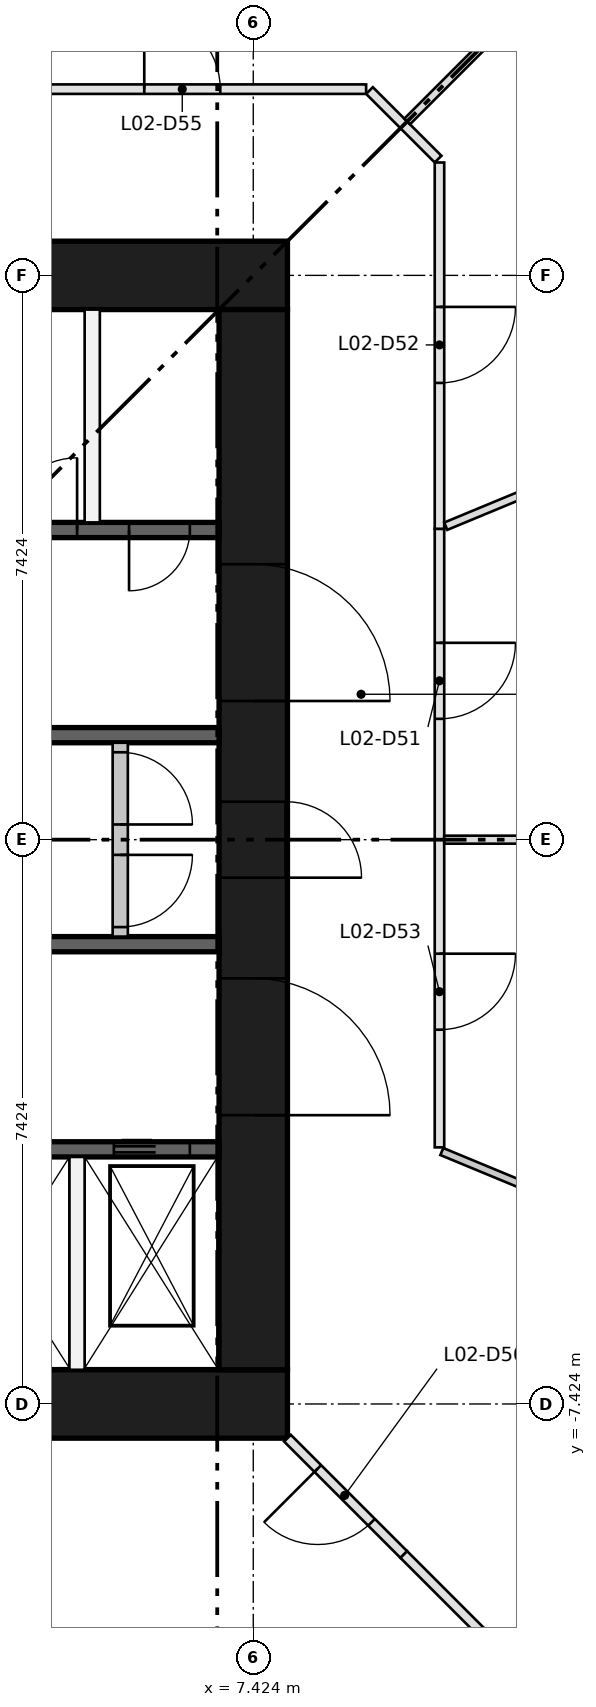
"""IFC4 building model, lengths in metres.
Left out: names, types, materials, properties, quantities, classifications, styles, units other than length and angle.
Written with IfcOpenShell. Run it as: python <this file> out.ifc"""

import sys

from ifc_helpers import new_model, si_unit, direction, frame, frame_2d, origin, place, context, subcontext, project, spatial, rectangle, extrude, element, fill, save


model = new_model("IFC4")
c1 = context("Model", 3, precision=1e-05, world=origin(), true_north=direction((0.0, 1.0)))
c2 = subcontext(c1, "Body", "Model", "MODEL_VIEW")
j1 = project(units=[si_unit("LENGTHUNIT", "METRE"), si_unit("PLANEANGLEUNIT", "RADIAN")], contexts=[c1])
p1 = place(None, origin())
s1 = spatial("IfcSite", under=j1, at=p1, CompositionType="ELEMENT")
p2 = place(p1, origin())
s2 = spatial("IfcBuilding", under=s1, at=p2, CompositionType="ELEMENT")
p3 = place(p2, frame((0.0, 0.0, 9.9)))
s3 = spatial("IfcBuildingStorey", under=s2, at=p3, CompositionType="ELEMENT", Elevation=9.9)
for number, where, z_axis, x_axis in (
    (1, (-7.874, -7.424, 0.0), (0.0, 0.0, 1.0), (1.0, 0.0, 0.0)),
    (2, (-7.874, 7.424, 0.0), (0.0, 0.0, 1.0), (1.0, 0.0, 0.0)),
):
    element("IfcWall", number, at=place(p3, frame(where, z_axis=z_axis, x_axis=x_axis)), inside=s3, PredefinedType="SHEAR", context=c2, shape_type="SweptSolid", body=[
        extrude(rectangle(XDim=15.748, YDim=0.9, at=frame_2d((7.874, 0.0))), origin(), (0.0, 0.0, 1.0), 4.5),
    ])
p4 = place(p3, frame((7.424, -6.974, 0.0), z_axis=(0.0, 0.0, 1.0), x_axis=(0.0, 1.0, 0.0)))
e3 = element("IfcWall", 3, at=p4, inside=s3, PredefinedType="SHEAR", context=c2, shape_type="SweptSolid", body=[
    extrude(rectangle(XDim=13.948, YDim=0.9, at=frame_2d((6.974, 0.0))), origin(), (0.0, 0.0, 1.0), 4.5),
])
p5 = place(p4, frame((6.474, 0.0, 0.0)))
e4 = element("IfcOpeningElement", 4, at=p5, cuts=e3, PredefinedType="OPENING", context=c2, shape_type="SweptSolid", body=[
    extrude(rectangle(XDim=1.0, YDim=2.1, at=frame_2d((0.5, 1.05))), frame((0.0, 0.46, 0.0), z_axis=(0.0, -1.0, 0.0), x_axis=(1.0, 0.0, 0.0)), (0.0, 0.0, 1.0), 0.92),
])
p6 = place(p4, frame((3.35, 0.0, 0.0)))
e5 = element("IfcOpeningElement", 5, at=p6, cuts=e3, PredefinedType="OPENING", context=c2, shape_type="SweptSolid", body=[
    extrude(rectangle(XDim=1.8, YDim=2.1, at=frame_2d((0.9, 1.05))), frame((0.0, 0.46, 0.0), z_axis=(0.0, -1.0, 0.0), x_axis=(1.0, 0.0, 0.0)), (0.0, 0.0, 1.0), 0.92),
])
p7 = place(p4, frame((8.799, 0.0, 0.0)))
e6 = element("IfcOpeningElement", 6, at=p7, cuts=e3, PredefinedType="OPENING", context=c2, shape_type="SweptSolid", body=[
    extrude(rectangle(XDim=1.8, YDim=2.1, at=frame_2d((0.9, 1.05))), frame((0.0, 0.46, 0.0), z_axis=(0.0, -1.0, 0.0), x_axis=(1.0, 0.0, 0.0)), (0.0, 0.0, 1.0), 0.92),
])
p8 = place(p3, frame((-6.974, -4.074, 0.0), z_axis=(0.0, 0.0, 1.0), x_axis=(1.0, 0.0, 0.0)))
e7 = element("IfcWall", 7, at=p8, inside=s3, PredefinedType="SHEAR", context=c2, shape_type="SweptSolid", body=[
    extrude(rectangle(XDim=13.948, YDim=0.2, at=frame_2d((6.974, 0.0))), origin(), (0.0, 0.0, 1.0), 4.1),
])
p9 = place(p8, frame((0.918, 0.0, 0.0)))
e8 = element("IfcOpeningElement", 8, at=p9, cuts=e7, PredefinedType="OPENING", context=c2, shape_type="SweptSolid", body=[
    extrude(rectangle(XDim=1.1, YDim=2.1, at=frame_2d((0.55, 1.05))), frame((0.0, 0.11, 0.0), z_axis=(0.0, -1.0, 0.0), x_axis=(1.0, 0.0, 0.0)), (0.0, 0.0, 1.0), 0.22),
])
p10 = place(p8, frame((4.055, 0.0, 0.0)))
e9 = element("IfcOpeningElement", 9, at=p10, cuts=e7, PredefinedType="OPENING", context=c2, shape_type="SweptSolid", body=[
    extrude(rectangle(XDim=1.1, YDim=2.1, at=frame_2d((0.55, 1.05))), frame((0.0, 0.11, 0.0), z_axis=(0.0, -1.0, 0.0), x_axis=(1.0, 0.0, 0.0)), (0.0, 0.0, 1.0), 0.22),
])
p11 = place(p8, frame((6.658, 0.0, 0.0)))
e10 = element("IfcOpeningElement", 10, at=p11, cuts=e7, PredefinedType="OPENING", context=c2, shape_type="SweptSolid", body=[
    extrude(rectangle(XDim=1.0, YDim=2.1, at=frame_2d((0.5, 1.05))), frame((0.0, 0.11, 0.0), z_axis=(0.0, -1.0, 0.0), x_axis=(1.0, 0.0, 0.0)), (0.0, 0.0, 1.0), 0.22),
])
p12 = place(p8, frame((8.627, 0.0, 0.0)))
e11 = element("IfcOpeningElement", 11, at=p12, cuts=e7, PredefinedType="OPENING", context=c2, shape_type="SweptSolid", body=[
    extrude(rectangle(XDim=1.0, YDim=2.1, at=frame_2d((0.5, 1.05))), frame((0.0, 0.11, 0.0), z_axis=(0.0, -1.0, 0.0), x_axis=(1.0, 0.0, 0.0)), (0.0, 0.0, 1.0), 0.22),
])
p13 = place(p8, frame((10.595, 0.0, 0.0)))
e12 = element("IfcOpeningElement", 12, at=p13, cuts=e7, PredefinedType="OPENING", context=c2, shape_type="SweptSolid", body=[
    extrude(rectangle(XDim=1.0, YDim=2.1, at=frame_2d((0.5, 1.05))), frame((0.0, 0.11, 0.0), z_axis=(0.0, -1.0, 0.0), x_axis=(1.0, 0.0, 0.0)), (0.0, 0.0, 1.0), 0.22),
])
p14 = place(p8, frame((12.564, 0.0, 0.0)))
e13 = element("IfcOpeningElement", 13, at=p14, cuts=e7, PredefinedType="OPENING", context=c2, shape_type="SweptSolid", body=[
    extrude(rectangle(XDim=1.0, YDim=2.1, at=frame_2d((0.5, 1.05))), frame((0.0, 0.11, 0.0), z_axis=(0.0, -1.0, 0.0), x_axis=(1.0, 0.0, 0.0)), (0.0, 0.0, 1.0), 0.22),
])
p15 = place(p3, frame((0.0, 4.074, 0.0), z_axis=(0.0, 0.0, 1.0), x_axis=(1.0, 0.0, 0.0)))
e14 = element("IfcWall", 14, at=p15, inside=s3, PredefinedType="SHEAR", context=c2, shape_type="SweptSolid", body=[
    extrude(rectangle(XDim=6.974, YDim=0.2, at=frame_2d((3.487, 0.0))), origin(), (0.0, 0.0, 1.0), 4.1),
])
p16 = place(p15, frame((0.155, 0.0, 0.0)))
e15 = element("IfcOpeningElement", 15, at=p16, cuts=e14, PredefinedType="OPENING", context=c2, shape_type="SweptSolid", body=[
    extrude(rectangle(XDim=0.95, YDim=2.1, at=frame_2d((0.475, 1.05))), frame((0.0, 0.11, 0.0), z_axis=(0.0, -1.0, 0.0), x_axis=(1.0, 0.0, 0.0)), (0.0, 0.0, 1.0), 0.22),
])
p17 = place(p15, frame((1.459, 0.0, 0.0)))
e16 = element("IfcOpeningElement", 16, at=p17, cuts=e14, PredefinedType="OPENING", context=c2, shape_type="SweptSolid", body=[
    extrude(rectangle(XDim=0.95, YDim=2.1, at=frame_2d((0.475, 1.05))), frame((0.0, 0.11, 0.0), z_axis=(0.0, -1.0, 0.0), x_axis=(1.0, 0.0, 0.0)), (0.0, 0.0, 1.0), 0.22),
])
p18 = place(p15, frame((2.883, 0.0, 0.0)))
e17 = element("IfcOpeningElement", 17, at=p18, cuts=e14, PredefinedType="OPENING", context=c2, shape_type="SweptSolid", body=[
    extrude(rectangle(XDim=0.8, YDim=2.1, at=frame_2d((0.4, 1.05))), frame((0.0, 0.11, 0.0), z_axis=(0.0, -1.0, 0.0), x_axis=(1.0, 0.0, 0.0)), (0.0, 0.0, 1.0), 0.22),
])
p19 = place(p15, frame((4.156, 0.0, 0.0)))
e18 = element("IfcOpeningElement", 18, at=p19, cuts=e14, PredefinedType="OPENING", context=c2, shape_type="SweptSolid", body=[
    extrude(rectangle(XDim=0.95, YDim=2.1, at=frame_2d((0.475, 1.05))), frame((0.0, 0.11, 0.0), z_axis=(0.0, -1.0, 0.0), x_axis=(1.0, 0.0, 0.0)), (0.0, 0.0, 1.0), 0.22),
])
p20 = place(p15, frame((5.79, 0.0, 0.0)))
e19 = element("IfcOpeningElement", 19, at=p20, cuts=e14, PredefinedType="OPENING", context=c2, shape_type="SweptSolid", body=[
    extrude(rectangle(XDim=0.8, YDim=2.1, at=frame_2d((0.4, 1.05))), frame((0.0, 0.11, 0.0), z_axis=(0.0, -1.0, 0.0), x_axis=(1.0, 0.0, 0.0)), (0.0, 0.0, 1.0), 0.22),
])
for number, where, z_axis, x_axis in (
    (20, (4.374, -1.375, 0.0), (0.0, 0.0, 1.0), (1.0, 0.0, 0.0)),
    (21, (4.374, 1.375, 0.0), (0.0, 0.0, 1.0), (1.0, 0.0, 0.0)),
):
    element("IfcWall", number, at=place(p3, frame(where, z_axis=z_axis, x_axis=x_axis)), inside=s3, PredefinedType="SHEAR", context=c2, shape_type="SweptSolid", body=[
        extrude(rectangle(XDim=2.6, YDim=0.2, at=frame_2d((1.3, 0.0))), origin(), (0.0, 0.0, 1.0), 4.1),
    ])
for number, where, z_axis, x_axis in (
    (22, (5.105, -6.974, 0.0), (0.0, 0.0, 1.0), (0.0, 1.0, 0.0)),
    (23, (5.305, 4.174, 0.0), (0.0, 0.0, 1.0), (0.0, 1.0, 0.0)),
):
    element("IfcWall", number, at=place(p3, frame(where, z_axis=z_axis, x_axis=x_axis)), inside=s3, PredefinedType="PARTITIONING", context=c2, shape_type="SweptSolid", body=[
        extrude(rectangle(XDim=2.8, YDim=0.2, at=frame_2d((1.4, 0.0))), origin(), (0.0, 0.0, 1.0), 4.1),
    ])
p21 = place(p3, frame((5.674, -1.275, 0.0), z_axis=(0.0, 0.0, 1.0), x_axis=(0.0, 1.0, 0.0)))
e24 = element("IfcWall", 24, at=p21, inside=s3, PredefinedType="PARTITIONING", context=c2, shape_type="SweptSolid", body=[
    extrude(rectangle(XDim=2.55, YDim=0.2, at=frame_2d((1.275, 0.0))), origin(), (0.0, 0.0, 1.0), 4.1),
])
p22 = place(p21, frame((0.125, 0.0, 0.0)))
e25 = element("IfcOpeningElement", 25, at=p22, cuts=e24, PredefinedType="OPENING", context=c2, shape_type="SweptSolid", body=[
    extrude(rectangle(XDim=0.95, YDim=2.1, at=frame_2d((0.475, 1.05))), frame((0.0, 0.11, 0.0), z_axis=(0.0, -1.0, 0.0), x_axis=(1.0, 0.0, 0.0)), (0.0, 0.0, 1.0), 0.22),
])
p23 = place(p21, frame((1.475, 0.0, 0.0)))
e26 = element("IfcOpeningElement", 26, at=p23, cuts=e24, PredefinedType="OPENING", context=c2, shape_type="SweptSolid", body=[
    extrude(rectangle(XDim=0.95, YDim=2.1, at=frame_2d((0.475, 1.05))), frame((0.0, 0.11, 0.0), z_axis=(0.0, -1.0, 0.0), x_axis=(1.0, 0.0, 0.0)), (0.0, 0.0, 1.0), 0.22),
])
p24 = place(p3, frame((9.405, -9.405, 0.0), z_axis=(0.0, 0.0, 1.0), x_axis=(-0.707106781187, 0.707106781187, 0.0)))
e27 = element("IfcWall", 27, at=p24, inside=s3, PredefinedType="PARTITIONING", context=c2, shape_type="SweptSolid", body=[
    extrude(rectangle(XDim=2.165, YDim=0.125, at=frame_2d((1.082, 0.0))), origin(), (0.0, 0.0, 1.0), 4.1),
])
p25 = place(p24, frame((0.6, 0.0, 0.0)))
e28 = element("IfcOpeningElement", 28, at=p25, cuts=e27, PredefinedType="OPENING", context=c2, shape_type="SweptSolid", body=[
    extrude(rectangle(XDim=1.0, YDim=2.1, at=frame_2d((0.5, 1.05))), frame((0.0, 0.073, 0.0), z_axis=(0.0, -1.0, 0.0), x_axis=(1.0, 0.0, 0.0)), (0.0, 0.0, 1.0), 0.145),
])
p26 = place(p3, frame((9.874, 4.09, 0.0), z_axis=(0.0, 0.0, 1.0), x_axis=(0.0, -1.0, 0.0)))
e29 = element("IfcWall", 29, at=p26, inside=s3, PredefinedType="PARTITIONING", context=c2, shape_type="SweptSolid", body=[
    extrude(rectangle(XDim=4.09, YDim=0.125, at=frame_2d((2.045, 0.0))), origin(), (0.0, 0.0, 1.0), 4.1),
])
p27 = place(p26, frame((1.5, 0.0, 0.0)))
e30 = element("IfcOpeningElement", 30, at=p27, cuts=e29, PredefinedType="OPENING", context=c2, shape_type="SweptSolid", body=[
    extrude(rectangle(XDim=1.0, YDim=2.1, at=frame_2d((0.5, 1.05))), frame((0.0, 0.073, 0.0), z_axis=(0.0, -1.0, 0.0), x_axis=(1.0, 0.0, 0.0)), (0.0, 0.0, 1.0), 0.145),
])
p28 = place(p3, frame((9.405, 9.405, 0.0), z_axis=(0.0, 0.0, 1.0), x_axis=(0.707106781187, -0.707106781187, 0.0)))
e31 = element("IfcWall", 31, at=p28, inside=s3, PredefinedType="PARTITIONING", context=c2, shape_type="SweptSolid", body=[
    extrude(rectangle(XDim=0.638, YDim=0.125, at=frame_2d((0.319, 0.0))), origin(), (0.0, 0.0, 1.0), 4.1),
])
p29 = place(p3, frame((9.874, 8.909, 0.0), z_axis=(0.0, 0.0, 1.0), x_axis=(0.0, -1.0, 0.0)))
e32 = element("IfcWall", 32, at=p29, inside=s3, PredefinedType="PARTITIONING", context=c2, shape_type="SweptSolid", body=[
    extrude(rectangle(XDim=4.819, YDim=0.125, at=frame_2d((2.41, 0.0))), origin(), (0.0, 0.0, 1.0), 4.1),
])
p30 = place(p29, frame((1.9, 0.0, 0.0)))
e33 = element("IfcOpeningElement", 33, at=p30, cuts=e32, PredefinedType="OPENING", context=c2, shape_type="SweptSolid", body=[
    extrude(rectangle(XDim=1.0, YDim=2.1, at=frame_2d((0.5, 1.05))), frame((0.0, 0.073, 0.0), z_axis=(0.0, -1.0, 0.0), x_axis=(1.0, 0.0, 0.0)), (0.0, 0.0, 1.0), 0.145),
])
p31 = place(p3, frame((9.874, 0.0, 0.0), z_axis=(0.0, 0.0, 1.0), x_axis=(0.0, -1.0, 0.0)))
e34 = element("IfcWall", 34, at=p31, inside=s3, PredefinedType="PARTITIONING", context=c2, shape_type="SweptSolid", body=[
    extrude(rectangle(XDim=4.048, YDim=0.125, at=frame_2d((2.024, 0.0))), origin(), (0.0, 0.0, 1.0), 4.1),
])
p32 = place(p31, frame((1.5, 0.0, 0.0)))
e35 = element("IfcOpeningElement", 35, at=p32, cuts=e34, PredefinedType="OPENING", context=c2, shape_type="SweptSolid", body=[
    extrude(rectangle(XDim=1.0, YDim=2.1, at=frame_2d((0.5, 1.05))), frame((0.0, 0.073, 0.0), z_axis=(0.0, -1.0, 0.0), x_axis=(1.0, 0.0, 0.0)), (0.0, 0.0, 1.0), 0.145),
])
p33 = place(p3, frame((4.09, 9.874, 0.0), z_axis=(0.0, 0.0, 1.0), x_axis=(1.0, 0.0, 0.0)))
e36 = element("IfcWall", 36, at=p33, inside=s3, PredefinedType="PARTITIONING", context=c2, shape_type="SweptSolid", body=[
    extrude(rectangle(XDim=4.819, YDim=0.125, at=frame_2d((2.41, 0.0))), origin(), (0.0, 0.0, 1.0), 4.1),
])
p34 = place(p33, frame((1.9, 0.0, 0.0)))
e37 = element("IfcOpeningElement", 37, at=p34, cuts=e36, PredefinedType="OPENING", context=c2, shape_type="SweptSolid", body=[
    extrude(rectangle(XDim=1.0, YDim=2.1, at=frame_2d((0.5, 1.05))), frame((0.0, 0.073, 0.0), z_axis=(0.0, -1.0, 0.0), x_axis=(1.0, 0.0, 0.0)), (0.0, 0.0, 1.0), 0.145),
])
p35 = place(p3, frame((8.953, 9.856, 0.0), z_axis=(0.0, 0.0, 1.0), x_axis=(0.707106781187, -0.707106781187, 0.0)))
e38 = element("IfcWall", 38, at=p35, inside=s3, PredefinedType="PARTITIONING", context=c2, shape_type="SweptSolid", body=[
    extrude(rectangle(XDim=0.638, YDim=0.125, at=frame_2d((0.319, 0.0))), origin(), (0.0, 0.0, 1.0), 4.1),
])
p36 = place(p3, frame((9.957, 4.124, 0.0), z_axis=(0.0, 0.0, 1.0), x_axis=(0.92386356406, 0.382721981342, 0.0)))
e39 = element("IfcWall", 39, at=p36, inside=s3, PredefinedType="PARTITIONING", context=c2, shape_type="SweptSolid", body=[
    extrude(rectangle(XDim=4.543, YDim=0.105, at=frame_2d((2.271, 0.0))), origin(), (0.0, 0.0, 1.0), 4.1),
])
p37 = place(p3, frame((15.32, 0.0, 0.0), z_axis=(0.0, 0.0, 1.0), x_axis=(-1.0, 0.0, 0.0)))
e40 = element("IfcWall", 40, at=p37, inside=s3, PredefinedType="PARTITIONING", context=c2, shape_type="SweptSolid", body=[
    extrude(rectangle(XDim=5.384, YDim=0.105, at=frame_2d((2.692, 0.0))), origin(), (0.0, 0.0, 1.0), 4.1),
])
p38 = place(p3, frame((13.216, 13.216, 0.0), z_axis=(0.0, 0.0, 1.0), x_axis=(-0.707106781187, -0.707106781187, 0.0)))
e41 = element("IfcWall", 41, at=p38, inside=s3, PredefinedType="PARTITIONING", context=c2, shape_type="SweptSolid", body=[
    extrude(rectangle(XDim=5.327, YDim=0.105, at=frame_2d((2.664, 0.0))), origin(), (0.0, 0.0, 1.0), 4.1),
])
p39 = place(p3, frame((4.124, 9.957, 0.0), z_axis=(0.0, 0.0, 1.0), x_axis=(0.382702629741, 0.923871580464, 0.0)))
e42 = element("IfcWall", 42, at=p39, inside=s3, PredefinedType="PARTITIONING", context=c2, shape_type="SweptSolid", body=[
    extrude(rectangle(XDim=4.343, YDim=0.105, at=frame_2d((2.171, 0.0))), origin(), (0.0, 0.0, 1.0), 4.1),
])
p40 = place(p3, frame((9.405, -9.405, 0.0), z_axis=(0.0, 0.0, 1.0), x_axis=(0.707106781187, -0.707106781187, 0.0)))
e43 = element("IfcWall", 43, at=p40, inside=s3, PredefinedType="PARTITIONING", context=c2, shape_type="SweptSolid", body=[
    extrude(rectangle(XDim=5.39, YDim=0.125, at=frame_2d((2.695, 0.0))), origin(), (0.0, 0.0, 1.0), 4.1),
])
p41 = place(p3, frame((9.905, -4.103, 0.0), z_axis=(0.0, 0.0, 1.0), x_axis=(0.923879022759, -0.382684663013, 0.0)))
e44 = element("IfcWall", 44, at=p41, inside=s3, PredefinedType="PARTITIONING", context=c2, shape_type="SweptSolid", body=[
    extrude(rectangle(XDim=4.599, YDim=0.1, at=frame_2d((2.3, 0.0))), origin(), (0.0, 0.0, 1.0), 4.1),
])
p42 = place(p14, origin())
e45 = element("IfcDoor", 45, at=p42, inside=s3, OperationType="DOUBLE_DOOR_SLIDING", PredefinedType="DOOR", context=c2, shape_type="SweptSolid", body=[
    extrude(rectangle(XDim=1.0, YDim=2.1, at=frame_2d((0.5, 1.05))), frame((0.0, 0.025, 0.0), z_axis=(0.0, -1.0, 0.0), x_axis=(1.0, 0.0, 0.0)), (0.0, 0.0, 1.0), 0.05),
])
fill(e13, e45)
p43 = place(p22, frame((0.95, 0.0, 0.0), z_axis=(0.0, 0.0, 1.0), x_axis=(-1.0, 0.0, 0.0)))
e46 = element("IfcDoor", 46, at=p43, inside=s3, OperationType="SINGLE_SWING_RIGHT", PredefinedType="DOOR", context=c2, shape_type="SweptSolid", body=[
    extrude(rectangle(XDim=0.95, YDim=2.1, at=frame_2d((0.475, 1.05))), frame((0.0, 0.025, 0.0), z_axis=(0.0, -1.0, 0.0), x_axis=(1.0, 0.0, 0.0)), (0.0, 0.0, 1.0), 0.05),
])
fill(e25, e46)
p44 = place(p23, frame((0.95, 0.0, 0.0), z_axis=(0.0, 0.0, 1.0), x_axis=(-1.0, 0.0, 0.0)))
e47 = element("IfcDoor", 47, at=p44, inside=s3, OperationType="SINGLE_SWING_LEFT", PredefinedType="DOOR", context=c2, shape_type="SweptSolid", body=[
    extrude(rectangle(XDim=0.95, YDim=2.1, at=frame_2d((0.475, 1.05))), frame((0.0, 0.025, 0.0), z_axis=(0.0, -1.0, 0.0), x_axis=(1.0, 0.0, 0.0)), (0.0, 0.0, 1.0), 0.05),
])
fill(e26, e47)
p45 = place(p19, origin())
e48 = element("IfcDoor", 48, at=p45, inside=s3, OperationType="SINGLE_SWING_RIGHT", PredefinedType="DOOR", context=c2, shape_type="SweptSolid", body=[
    extrude(rectangle(XDim=0.95, YDim=2.1, at=frame_2d((0.475, 1.05))), frame((0.0, 0.025, 0.0), z_axis=(0.0, -1.0, 0.0), x_axis=(1.0, 0.0, 0.0)), (0.0, 0.0, 1.0), 0.05),
])
fill(e18, e48)
p46 = place(p20, frame((0.8, 0.0, 0.0), z_axis=(0.0, 0.0, 1.0), x_axis=(-1.0, 0.0, 0.0)))
e49 = element("IfcDoor", 49, at=p46, inside=s3, OperationType="SINGLE_SWING_LEFT", PredefinedType="DOOR", context=c2, shape_type="SweptSolid", body=[
    extrude(rectangle(XDim=0.8, YDim=2.1, at=frame_2d((0.4, 1.05))), frame((0.0, 0.025, 0.0), z_axis=(0.0, -1.0, 0.0), x_axis=(1.0, 0.0, 0.0)), (0.0, 0.0, 1.0), 0.05),
])
fill(e19, e49)
p47 = place(p5, frame((1.0, 0.0, 0.0), z_axis=(0.0, 0.0, 1.0), x_axis=(-1.0, 0.0, 0.0)))
e50 = element("IfcDoor", 50, at=p47, inside=s3, OperationType="SINGLE_SWING_LEFT", PredefinedType="DOOR", context=c2, shape_type="SweptSolid", body=[
    extrude(rectangle(XDim=1.0, YDim=2.1, at=frame_2d((0.5, 1.05))), frame((0.0, 0.45, 0.0), z_axis=(0.0, -1.0, 0.0), x_axis=(1.0, 0.0, 0.0)), (0.0, 0.0, 1.0), 0.05),
])
fill(e4, e50)
p48 = place(p6, frame((1.8, 0.0, 0.0), z_axis=(0.0, 0.0, 1.0), x_axis=(-1.0, 0.0, 0.0)))
e51 = element("IfcDoor", 51, at=p48, inside=s3, OperationType="DOUBLE_DOOR_SINGLE_SWING", PredefinedType="DOOR", context=c2, shape_type="SweptSolid", body=[
    extrude(rectangle(XDim=1.8, YDim=2.1, at=frame_2d((0.9, 1.05))), frame((0.0, 0.025, 0.0), z_axis=(0.0, -1.0, 0.0), x_axis=(1.0, 0.0, 0.0)), (0.0, 0.0, 1.0), 0.05),
])
fill(e5, e51)
p49 = place(p7, frame((1.8, 0.0, 0.0), z_axis=(0.0, 0.0, 1.0), x_axis=(-1.0, 0.0, 0.0)))
e52 = element("IfcDoor", 52, at=p49, inside=s3, OperationType="DOUBLE_DOOR_SINGLE_SWING", PredefinedType="DOOR", context=c2, shape_type="SweptSolid", body=[
    extrude(rectangle(XDim=1.8, YDim=2.1, at=frame_2d((0.9, 1.05))), frame((0.0, 0.025, 0.0), z_axis=(0.0, -1.0, 0.0), x_axis=(1.0, 0.0, 0.0)), (0.0, 0.0, 1.0), 0.05),
])
fill(e6, e52)
p50 = place(p25, origin())
e53 = element("IfcDoor", 53, at=p50, inside=s3, OperationType="SINGLE_SWING_RIGHT", PredefinedType="DOOR", context=c2, shape_type="SweptSolid", body=[
    extrude(rectangle(XDim=1.0, YDim=2.1, at=frame_2d((0.5, 1.05))), frame((0.0, 0.025, 0.0), z_axis=(0.0, -1.0, 0.0), x_axis=(1.0, 0.0, 0.0)), (0.0, 0.0, 1.0), 0.05),
])
fill(e28, e53)
p51 = place(p27, origin())
e54 = element("IfcDoor", 54, at=p51, inside=s3, OperationType="SINGLE_SWING_LEFT", PredefinedType="DOOR", context=c2, shape_type="SweptSolid", body=[
    extrude(rectangle(XDim=1.0, YDim=2.1, at=frame_2d((0.5, 1.05))), frame((0.0, 0.025, 0.0), z_axis=(0.0, -1.0, 0.0), x_axis=(1.0, 0.0, 0.0)), (0.0, 0.0, 1.0), 0.05),
])
fill(e30, e54)
p52 = place(p30, origin())
e55 = element("IfcDoor", 55, at=p52, inside=s3, OperationType="SINGLE_SWING_LEFT", PredefinedType="DOOR", context=c2, shape_type="SweptSolid", body=[
    extrude(rectangle(XDim=1.0, YDim=2.1, at=frame_2d((0.5, 1.05))), frame((0.0, 0.025, 0.0), z_axis=(0.0, -1.0, 0.0), x_axis=(1.0, 0.0, 0.0)), (0.0, 0.0, 1.0), 0.05),
])
fill(e33, e55)
p53 = place(p32, origin())
e56 = element("IfcDoor", 56, at=p53, inside=s3, OperationType="SINGLE_SWING_LEFT", PredefinedType="DOOR", context=c2, shape_type="SweptSolid", body=[
    extrude(rectangle(XDim=1.0, YDim=2.1, at=frame_2d((0.5, 1.05))), frame((0.0, 0.025, 0.0), z_axis=(0.0, -1.0, 0.0), x_axis=(1.0, 0.0, 0.0)), (0.0, 0.0, 1.0), 0.05),
])
fill(e35, e56)
p54 = place(p34, origin())
e57 = element("IfcDoor", 57, at=p54, inside=s3, OperationType="SINGLE_SWING_LEFT", PredefinedType="DOOR", context=c2, shape_type="SweptSolid", body=[
    extrude(rectangle(XDim=1.0, YDim=2.1, at=frame_2d((0.5, 1.05))), frame((0.0, 0.025, 0.0), z_axis=(0.0, -1.0, 0.0), x_axis=(1.0, 0.0, 0.0)), (0.0, 0.0, 1.0), 0.05),
])
fill(e37, e57)
save(model, sys.argv[1])
